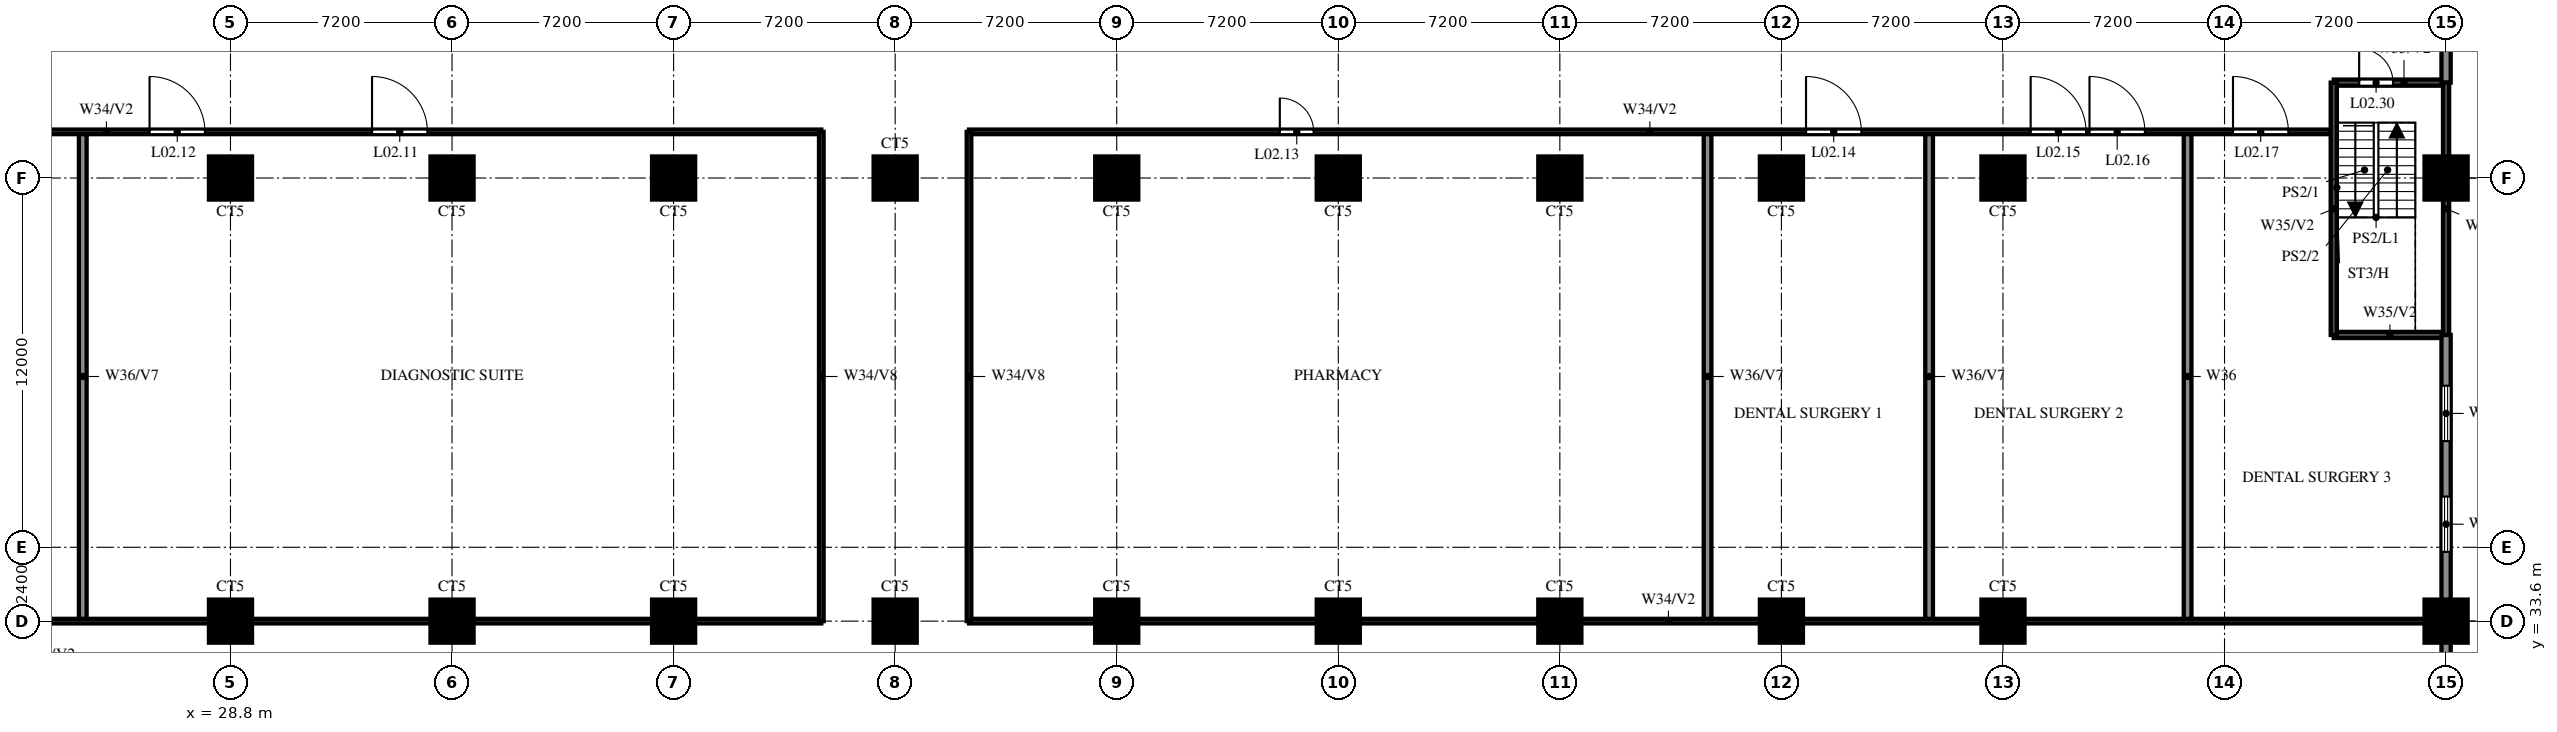
"""IFC4 building model, lengths in metres.
Left out: names, types, materials, properties, quantities, classifications, styles, units other than length and angle.
Written with IfcOpenShell. Run it as: python <this file> out.ifc"""

import sys

from ifc_helpers import new_model, si_unit, direction, frame, frame_2d, origin, origin_2d, place, context, subcontext, project, spatial, rectangle, circle, extrude, source, transform, mapped, element, fill, save


model = new_model("IFC4")
c1 = context("Model", 3, precision=1e-05, world=origin(), true_north=direction((0.0, 1.0)))
c2 = subcontext(c1, "Body", "Model", "MODEL_VIEW")
j1 = project(units=[si_unit("LENGTHUNIT", "METRE"), si_unit("PLANEANGLEUNIT", "RADIAN")], contexts=[c1])
p1 = place(None, origin())
s1 = spatial("IfcSite", under=j1, at=p1, CompositionType="ELEMENT")
p2 = place(p1, origin())
s2 = spatial("IfcBuilding", under=s1, at=p2, CompositionType="ELEMENT")
p3 = place(p2, frame((0.0, 0.0, 13.2)))
s3 = spatial("IfcBuildingStorey", under=s2, at=p3, CompositionType="ELEMENT", Elevation=13.2)
m1 = source(origin(), c2, "Body", "SweptSolid", [
    extrude(circle(Radius=0.7, at=origin_2d()), origin(), (0.0, 0.0, 1.0), 3.8),
])
for number, where, z_axis, x_axis in (
    (1, (28.8, 33.6, 0.0), (0.0, 0.0, 1.0), (1.0, 0.0, 0.0)),
    (2, (36.0, 33.6, 0.0), (0.0, 0.0, 1.0), (1.0, 0.0, 0.0)),
    (3, (43.2, 33.6, 0.0), (0.0, 0.0, 1.0), (1.0, 0.0, 0.0)),
    (4, (50.4, 33.6, 0.0), (0.0, 0.0, 1.0), (1.0, 0.0, 0.0)),
    (5, (57.6, 33.6, 0.0), (0.0, 0.0, 1.0), (1.0, 0.0, 0.0)),
    (6, (64.8, 33.6, 0.0), (0.0, 0.0, 1.0), (1.0, 0.0, 0.0)),
    (7, (72.0, 33.6, 0.0), (0.0, 0.0, 1.0), (1.0, 0.0, 0.0)),
    (8, (79.2, 33.6, 0.0), (0.0, 0.0, 1.0), (1.0, 0.0, 0.0)),
    (9, (86.4, 33.6, 0.0), (0.0, 0.0, 1.0), (1.0, 0.0, 0.0)),
    (10, (100.8, 33.6, 0.0), (0.0, 0.0, 1.0), (1.0, 0.0, 0.0)),
    (11, (28.8, 48.0, 0.0), (0.0, 0.0, 1.0), (1.0, 0.0, 0.0)),
    (12, (36.0, 48.0, 0.0), (0.0, 0.0, 1.0), (1.0, 0.0, 0.0)),
    (13, (43.2, 48.0, 0.0), (0.0, 0.0, 1.0), (1.0, 0.0, 0.0)),
    (14, (50.4, 48.0, 0.0), (0.0, 0.0, 1.0), (1.0, 0.0, 0.0)),
    (15, (57.6, 48.0, 0.0), (0.0, 0.0, 1.0), (1.0, 0.0, 0.0)),
    (16, (64.8, 48.0, 0.0), (0.0, 0.0, 1.0), (1.0, 0.0, 0.0)),
    (17, (72.0, 48.0, 0.0), (0.0, 0.0, 1.0), (1.0, 0.0, 0.0)),
    (18, (79.2, 48.0, 0.0), (0.0, 0.0, 1.0), (1.0, 0.0, 0.0)),
    (19, (86.4, 48.0, 0.0), (0.0, 0.0, 1.0), (1.0, 0.0, 0.0)),
    (20, (100.8, 48.0, 0.0), (0.0, 0.0, 1.0), (1.0, 0.0, 0.0)),
):
    element("IfcColumn", number, at=place(p3, frame(where, z_axis=z_axis, x_axis=x_axis)), inside=s3, PredefinedType="COLUMN", context=c2, shape_type="MappedRepresentation", body=[
        mapped(m1, transform((0.0, 0.0, 0.0))),
    ])
p4 = place(p3, frame((0.15, 33.6, 0.0), z_axis=(0.0, 0.0, 1.0), x_axis=(1.0, 0.0, 0.0)))
e21 = element("IfcWall", 21, at=p4, inside=s3, PredefinedType="PARTITIONING", context=c2, shape_type="SweptSolid", body=[
    extrude(rectangle(XDim=47.85, YDim=0.15, at=frame_2d((23.925, 0.0))), origin(), (0.0, 0.0, 1.0), 2.6),
])
p5 = place(p3, frame((52.8, 33.6, 0.0), z_axis=(0.0, 0.0, 1.0), x_axis=(1.0, 0.0, 0.0)))
e22 = element("IfcWall", 22, at=p5, inside=s3, PredefinedType="PARTITIONING", context=c2, shape_type="SweptSolid", body=[
    extrude(rectangle(XDim=47.85, YDim=0.15, at=frame_2d((23.925, 0.0))), origin(), (0.0, 0.0, 1.0), 2.6),
])
p6 = place(p3, frame((97.15, 42.9, 0.0), z_axis=(0.0, 0.0, 1.0), x_axis=(1.0, 0.0, 0.0)))
e23 = element("IfcWall", 23, at=p6, inside=s3, PredefinedType="SOLIDWALL", context=c2, shape_type="SweptSolid", body=[
    extrude(rectangle(XDim=3.65, YDim=0.2, at=frame_2d((1.825, 0.0))), origin(), (0.0, 0.0, 1.0), 3.8),
])
p7 = place(p3, frame((3.75, 49.5, 0.0), z_axis=(0.0, 0.0, 1.0), x_axis=(1.0, 0.0, 0.0)))
e24 = element("IfcWall", 24, at=p7, inside=s3, PredefinedType="PARTITIONING", context=c2, shape_type="SweptSolid", body=[
    extrude(rectangle(XDim=44.25, YDim=0.15, at=frame_2d((22.125, 0.0))), origin(), (0.0, 0.0, 1.0), 2.6),
])
p8 = place(p7, frame((8.025, 0.0, 0.0)))
e25 = element("IfcOpeningElement", 25, at=p8, cuts=e24, PredefinedType="OPENING", context=c2, shape_type="SweptSolid", body=[
    extrude(rectangle(XDim=1.8, YDim=2.1, at=frame_2d((0.9, 1.05))), frame((0.0, 0.085, 0.0), z_axis=(0.0, -1.0, 0.0), x_axis=(1.0, 0.0, 0.0)), (0.0, 0.0, 1.0), 0.17),
])
p9 = place(p7, frame((2.663, 0.0, 0.0)))
e26 = element("IfcOpeningElement", 26, at=p9, cuts=e24, PredefinedType="OPENING", context=c2, shape_type="SweptSolid", body=[
    extrude(rectangle(XDim=1.8, YDim=2.1, at=frame_2d((0.9, 1.05))), frame((0.0, 0.085, 0.0), z_axis=(0.0, -1.0, 0.0), x_axis=(1.0, 0.0, 0.0)), (0.0, 0.0, 1.0), 0.17),
])
p10 = place(p7, frame((29.65, 0.0, 0.0)))
e27 = element("IfcOpeningElement", 27, at=p10, cuts=e24, PredefinedType="OPENING", context=c2, shape_type="SweptSolid", body=[
    extrude(rectangle(XDim=1.8, YDim=2.1, at=frame_2d((0.9, 1.05))), frame((0.0, 0.085, 0.0), z_axis=(0.0, -1.0, 0.0), x_axis=(1.0, 0.0, 0.0)), (0.0, 0.0, 1.0), 0.17),
])
p11 = place(p7, frame((22.42, 0.0, 0.0)))
e28 = element("IfcOpeningElement", 28, at=p11, cuts=e24, PredefinedType="OPENING", context=c2, shape_type="SweptSolid", body=[
    extrude(rectangle(XDim=1.8, YDim=2.1, at=frame_2d((0.9, 1.05))), frame((0.0, 0.085, 0.0), z_axis=(0.0, -1.0, 0.0), x_axis=(1.0, 0.0, 0.0)), (0.0, 0.0, 1.0), 0.17),
])
p12 = place(p3, frame((52.8, 49.5, 0.0), z_axis=(0.0, 0.0, 1.0), x_axis=(1.0, 0.0, 0.0)))
e29 = element("IfcWall", 29, at=p12, inside=s3, PredefinedType="PARTITIONING", context=c2, shape_type="SweptSolid", body=[
    extrude(rectangle(XDim=44.25, YDim=0.15, at=frame_2d((22.125, 0.0))), origin(), (0.0, 0.0, 1.0), 2.6),
])
p13 = place(p12, frame((10.1, 0.0, 0.0)))
e30 = element("IfcOpeningElement", 30, at=p13, cuts=e29, PredefinedType="OPENING", context=c2, shape_type="SweptSolid", body=[
    extrude(rectangle(XDim=1.1, YDim=2.1, at=frame_2d((0.55, 1.05))), frame((0.0, 0.085, 0.0), z_axis=(0.0, -1.0, 0.0), x_axis=(1.0, 0.0, 0.0)), (0.0, 0.0, 1.0), 0.17),
])
p14 = place(p12, frame((27.2, 0.0, 0.0)))
e31 = element("IfcOpeningElement", 31, at=p14, cuts=e29, PredefinedType="OPENING", context=c2, shape_type="SweptSolid", body=[
    extrude(rectangle(XDim=1.8, YDim=2.1, at=frame_2d((0.9, 1.05))), frame((0.0, 0.085, 0.0), z_axis=(0.0, -1.0, 0.0), x_axis=(1.0, 0.0, 0.0)), (0.0, 0.0, 1.0), 0.17),
])
p15 = place(p12, frame((34.5, 0.0, 0.0)))
e32 = element("IfcOpeningElement", 32, at=p15, cuts=e29, PredefinedType="OPENING", context=c2, shape_type="SweptSolid", body=[
    extrude(rectangle(XDim=1.8, YDim=2.1, at=frame_2d((0.9, 1.05))), frame((0.0, 0.085, 0.0), z_axis=(0.0, -1.0, 0.0), x_axis=(1.0, 0.0, 0.0)), (0.0, 0.0, 1.0), 0.17),
])
p16 = place(p12, frame((36.412, 0.0, 0.0)))
e33 = element("IfcOpeningElement", 33, at=p16, cuts=e29, PredefinedType="OPENING", context=c2, shape_type="SweptSolid", body=[
    extrude(rectangle(XDim=1.8, YDim=2.1, at=frame_2d((0.9, 1.05))), frame((0.0, 0.085, 0.0), z_axis=(0.0, -1.0, 0.0), x_axis=(1.0, 0.0, 0.0)), (0.0, 0.0, 1.0), 0.17),
])
p17 = place(p12, frame((41.075, 0.0, 0.0)))
e34 = element("IfcOpeningElement", 34, at=p17, cuts=e29, PredefinedType="OPENING", context=c2, shape_type="SweptSolid", body=[
    extrude(rectangle(XDim=1.8, YDim=2.1, at=frame_2d((0.9, 1.05))), frame((0.0, 0.085, 0.0), z_axis=(0.0, -1.0, 0.0), x_axis=(1.0, 0.0, 0.0)), (0.0, 0.0, 1.0), 0.17),
])
p18 = place(p3, frame((97.15, 51.1, 0.0), z_axis=(0.0, 0.0, 1.0), x_axis=(1.0, 0.0, 0.0)))
e35 = element("IfcWall", 35, at=p18, inside=s3, PredefinedType="SOLIDWALL", context=c2, shape_type="SweptSolid", body=[
    extrude(rectangle(XDim=3.65, YDim=0.2, at=frame_2d((1.825, 0.0))), origin(), (0.0, 0.0, 1.0), 3.8),
])
p19 = place(p18, frame((0.825, 0.0, 0.0)))
e36 = element("IfcOpeningElement", 36, at=p19, cuts=e35, PredefinedType="OPENING", context=c2, shape_type="SweptSolid", body=[
    extrude(rectangle(XDim=1.1, YDim=2.1, at=frame_2d((0.55, 1.05))), frame((0.0, 0.11, 0.0), z_axis=(0.0, -1.0, 0.0), x_axis=(1.0, 0.0, 0.0)), (0.0, 0.0, 1.0), 0.22),
])
p20 = place(p3, frame((24.0, 33.675, 0.0), z_axis=(0.0, 0.0, 1.0), x_axis=(0.0, 1.0, 0.0)))
e37 = element("IfcWall", 37, at=p20, inside=s3, PredefinedType="SOLIDWALL", context=c2, shape_type="SweptSolid", body=[
    extrude(rectangle(XDim=15.75, YDim=0.25, at=frame_2d((7.875, 0.0))), origin(), (0.0, 0.0, 1.0), 2.9),
])
for number, where, z_axis, x_axis in (
    (38, (48.0, 33.6, 0.0), (0.0, 0.0, 1.0), (0.0, 1.0, 0.0)),
    (39, (52.8, 33.6, 0.0), (0.0, 0.0, 1.0), (0.0, 1.0, 0.0)),
):
    element("IfcWall", number, at=place(p3, frame(where, z_axis=z_axis, x_axis=x_axis)), inside=s3, PredefinedType="PARTITIONING", context=c2, shape_type="SweptSolid", body=[
        extrude(rectangle(XDim=15.9, YDim=0.15, at=frame_2d((7.95, 0.0))), origin(), (0.0, 0.0, 1.0), 2.9),
    ])
for number, where, z_axis, x_axis in (
    (40, (76.8, 33.675, 0.0), (0.0, 0.0, 1.0), (0.0, 1.0, 0.0)),
    (41, (84.0, 33.675, 0.0), (0.0, 0.0, 1.0), (0.0, 1.0, 0.0)),
):
    element("IfcWall", number, at=place(p3, frame(where, z_axis=z_axis, x_axis=x_axis)), inside=s3, PredefinedType="SOLIDWALL", context=c2, shape_type="SweptSolid", body=[
        extrude(rectangle(XDim=15.75, YDim=0.25, at=frame_2d((7.875, 0.0))), origin(), (0.0, 0.0, 1.0), 2.9),
    ])
p21 = place(p3, frame((92.4, 33.675, 0.0), z_axis=(0.0, 0.0, 1.0), x_axis=(0.0, 1.0, 0.0)))
e42 = element("IfcWall", 42, at=p21, inside=s3, PredefinedType="SOLIDWALL", context=c2, shape_type="SweptSolid", body=[
    extrude(rectangle(XDim=15.75, YDim=0.25, at=frame_2d((7.875, 0.0))), origin(), (0.0, 0.0, 1.0), 3.8),
])
p22 = place(p3, frame((97.15, 42.9, 0.0), z_axis=(0.0, 0.0, 1.0), x_axis=(0.0, 1.0, 0.0)))
e43 = element("IfcWall", 43, at=p22, inside=s3, PredefinedType="SOLIDWALL", context=c2, shape_type="SweptSolid", body=[
    extrude(rectangle(XDim=8.2, YDim=0.2, at=frame_2d((4.1, 0.0))), origin(), (0.0, 0.0, 1.0), 3.8),
])
p23 = place(p3, frame((100.8, 9.6, 0.0), z_axis=(0.0, 0.0, 1.0), x_axis=(0.0, 1.0, 0.0)))
e44 = element("IfcWall", 44, at=p23, inside=s3, PredefinedType="SOLIDWALL", context=c2, shape_type="SweptSolid", body=[
    extrude(rectangle(XDim=33.3, YDim=0.3, at=frame_2d((16.65, 0.0))), origin(), (0.0, 0.0, 1.0), 3.8),
])
p24 = place(p23, frame((1.05, 0.0, 0.6)))
e45 = element("IfcOpeningElement", 45, at=p24, cuts=e44, PredefinedType="OPENING", context=c2, shape_type="SweptSolid", body=[
    extrude(rectangle(XDim=1.8, YDim=2.4, at=frame_2d((0.9, 1.2))), frame((0.0, 0.16, 0.0), z_axis=(0.0, -1.0, 0.0), x_axis=(1.0, 0.0, 0.0)), (0.0, 0.0, 1.0), 0.32),
])
p25 = place(p23, frame((4.65, 0.0, 0.6)))
e46 = element("IfcOpeningElement", 46, at=p25, cuts=e44, PredefinedType="OPENING", context=c2, shape_type="SweptSolid", body=[
    extrude(rectangle(XDim=1.8, YDim=2.4, at=frame_2d((0.9, 1.2))), frame((0.0, 0.16, 0.0), z_axis=(0.0, -1.0, 0.0), x_axis=(1.0, 0.0, 0.0)), (0.0, 0.0, 1.0), 0.32),
])
p26 = place(p23, frame((11.85, 0.0, 0.6)))
e47 = element("IfcOpeningElement", 47, at=p26, cuts=e44, PredefinedType="OPENING", context=c2, shape_type="SweptSolid", body=[
    extrude(rectangle(XDim=1.8, YDim=2.4, at=frame_2d((0.9, 1.2))), frame((0.0, 0.16, 0.0), z_axis=(0.0, -1.0, 0.0), x_axis=(1.0, 0.0, 0.0)), (0.0, 0.0, 1.0), 0.32),
])
p27 = place(p23, frame((15.45, 0.0, 0.6)))
e48 = element("IfcOpeningElement", 48, at=p27, cuts=e44, PredefinedType="OPENING", context=c2, shape_type="SweptSolid", body=[
    extrude(rectangle(XDim=1.8, YDim=2.4, at=frame_2d((0.9, 1.2))), frame((0.0, 0.16, 0.0), z_axis=(0.0, -1.0, 0.0), x_axis=(1.0, 0.0, 0.0)), (0.0, 0.0, 1.0), 0.32),
])
p28 = place(p23, frame((26.25, 0.0, 0.6)))
e49 = element("IfcOpeningElement", 49, at=p28, cuts=e44, PredefinedType="OPENING", context=c2, shape_type="SweptSolid", body=[
    extrude(rectangle(XDim=1.8, YDim=2.4, at=frame_2d((0.9, 1.2))), frame((0.0, 0.16, 0.0), z_axis=(0.0, -1.0, 0.0), x_axis=(1.0, 0.0, 0.0)), (0.0, 0.0, 1.0), 0.32),
])
p29 = place(p23, frame((29.85, 0.0, 0.6)))
e50 = element("IfcOpeningElement", 50, at=p29, cuts=e44, PredefinedType="OPENING", context=c2, shape_type="SweptSolid", body=[
    extrude(rectangle(XDim=1.8, YDim=2.4, at=frame_2d((0.9, 1.2))), frame((0.0, 0.16, 0.0), z_axis=(0.0, -1.0, 0.0), x_axis=(1.0, 0.0, 0.0)), (0.0, 0.0, 1.0), 0.32),
])
p30 = place(p3, frame((100.8, 51.1, 0.0), z_axis=(0.0, 0.0, 1.0), x_axis=(0.0, 1.0, 0.0)))
e51 = element("IfcWall", 51, at=p30, inside=s3, PredefinedType="SOLIDWALL", context=c2, shape_type="SweptSolid", body=[
    extrude(rectangle(XDim=3.2, YDim=0.3, at=frame_2d((1.6, 0.0))), origin(), (0.0, 0.0, 1.0), 3.8),
])
p31 = place(p3, frame((100.8, 42.9, 0.0), z_axis=(0.0, 0.0, 1.0), x_axis=(0.0, 1.0, 0.0)))
e52 = element("IfcWall", 52, at=p31, inside=s3, PredefinedType="SOLIDWALL", context=c2, shape_type="SweptSolid", body=[
    extrude(rectangle(XDim=8.2, YDim=0.2, at=frame_2d((4.1, 0.0))), origin(), (0.0, 0.0, 1.0), 3.8),
])
p32 = place(p10, origin())
e53 = element("IfcDoor", 53, at=p32, inside=s3, OperationType="DOUBLE_DOOR_SINGLE_SWING", PredefinedType="DOOR", context=c2, shape_type="SweptSolid", body=[
    extrude(rectangle(XDim=1.8, YDim=2.1, at=frame_2d((0.9, 1.05))), frame((0.0, 0.025, 0.0), z_axis=(0.0, -1.0, 0.0), x_axis=(1.0, 0.0, 0.0)), (0.0, 0.0, 1.0), 0.05),
])
fill(e27, e53)
p33 = place(p11, origin())
e54 = element("IfcDoor", 54, at=p33, inside=s3, OperationType="DOUBLE_DOOR_SINGLE_SWING", PredefinedType="DOOR", context=c2, shape_type="SweptSolid", body=[
    extrude(rectangle(XDim=1.8, YDim=2.1, at=frame_2d((0.9, 1.05))), frame((0.0, 0.025, 0.0), z_axis=(0.0, -1.0, 0.0), x_axis=(1.0, 0.0, 0.0)), (0.0, 0.0, 1.0), 0.05),
])
fill(e28, e54)
p34 = place(p13, origin())
e55 = element("IfcDoor", 55, at=p34, inside=s3, OperationType="SINGLE_SWING_LEFT", PredefinedType="DOOR", context=c2, shape_type="SweptSolid", body=[
    extrude(rectangle(XDim=1.1, YDim=2.1, at=frame_2d((0.55, 1.05))), frame((0.0, 0.025, 0.0), z_axis=(0.0, -1.0, 0.0), x_axis=(1.0, 0.0, 0.0)), (0.0, 0.0, 1.0), 0.05),
])
fill(e30, e55)
p35 = place(p14, origin())
e56 = element("IfcDoor", 56, at=p35, inside=s3, OperationType="DOUBLE_DOOR_SINGLE_SWING", PredefinedType="DOOR", context=c2, shape_type="SweptSolid", body=[
    extrude(rectangle(XDim=1.8, YDim=2.1, at=frame_2d((0.9, 1.05))), frame((0.0, 0.025, 0.0), z_axis=(0.0, -1.0, 0.0), x_axis=(1.0, 0.0, 0.0)), (0.0, 0.0, 1.0), 0.05),
])
fill(e31, e56)
p36 = place(p15, origin())
e57 = element("IfcDoor", 57, at=p36, inside=s3, OperationType="DOUBLE_DOOR_SINGLE_SWING", PredefinedType="DOOR", context=c2, shape_type="SweptSolid", body=[
    extrude(rectangle(XDim=1.8, YDim=2.1, at=frame_2d((0.9, 1.05))), frame((0.0, 0.025, 0.0), z_axis=(0.0, -1.0, 0.0), x_axis=(1.0, 0.0, 0.0)), (0.0, 0.0, 1.0), 0.05),
])
fill(e32, e57)
p37 = place(p16, origin())
e58 = element("IfcDoor", 58, at=p37, inside=s3, OperationType="DOUBLE_DOOR_SINGLE_SWING", PredefinedType="DOOR", context=c2, shape_type="SweptSolid", body=[
    extrude(rectangle(XDim=1.8, YDim=2.1, at=frame_2d((0.9, 1.05))), frame((0.0, 0.025, 0.0), z_axis=(0.0, -1.0, 0.0), x_axis=(1.0, 0.0, 0.0)), (0.0, 0.0, 1.0), 0.05),
])
fill(e33, e58)
p38 = place(p17, origin())
e59 = element("IfcDoor", 59, at=p38, inside=s3, OperationType="DOUBLE_DOOR_SINGLE_SWING", PredefinedType="DOOR", context=c2, shape_type="SweptSolid", body=[
    extrude(rectangle(XDim=1.8, YDim=2.1, at=frame_2d((0.9, 1.05))), frame((0.0, 0.025, 0.0), z_axis=(0.0, -1.0, 0.0), x_axis=(1.0, 0.0, 0.0)), (0.0, 0.0, 1.0), 0.05),
])
fill(e34, e59)
p39 = place(p19, origin())
e60 = element("IfcDoor", 60, at=p39, inside=s3, OperationType="SINGLE_SWING_LEFT", PredefinedType="DOOR", context=c2, shape_type="SweptSolid", body=[
    extrude(rectangle(XDim=1.1, YDim=2.1, at=frame_2d((0.55, 1.05))), frame((0.0, 0.025, 0.0), z_axis=(0.0, -1.0, 0.0), x_axis=(1.0, 0.0, 0.0)), (0.0, 0.0, 1.0), 0.05),
])
fill(e36, e60)
p40 = place(p28, origin())
e61 = element("IfcWindow", 61, at=p40, inside=s3, PartitioningType="DOUBLE_PANEL_VERTICAL", PredefinedType="WINDOW", context=c2, shape_type="SweptSolid", body=[
    extrude(rectangle(XDim=1.8, YDim=2.4, at=frame_2d((0.9, 1.2))), frame((0.0, 0.03, 0.0), z_axis=(0.0, -1.0, 0.0), x_axis=(1.0, 0.0, 0.0)), (0.0, 0.0, 1.0), 0.06),
])
fill(e49, e61)
p41 = place(p29, origin())
e62 = element("IfcWindow", 62, at=p41, inside=s3, PartitioningType="DOUBLE_PANEL_VERTICAL", PredefinedType="WINDOW", context=c2, shape_type="SweptSolid", body=[
    extrude(rectangle(XDim=1.8, YDim=2.4, at=frame_2d((0.9, 1.2))), frame((0.0, 0.03, 0.0), z_axis=(0.0, -1.0, 0.0), x_axis=(1.0, 0.0, 0.0)), (0.0, 0.0, 1.0), 0.06),
])
fill(e50, e62)
save(model, sys.argv[1])
